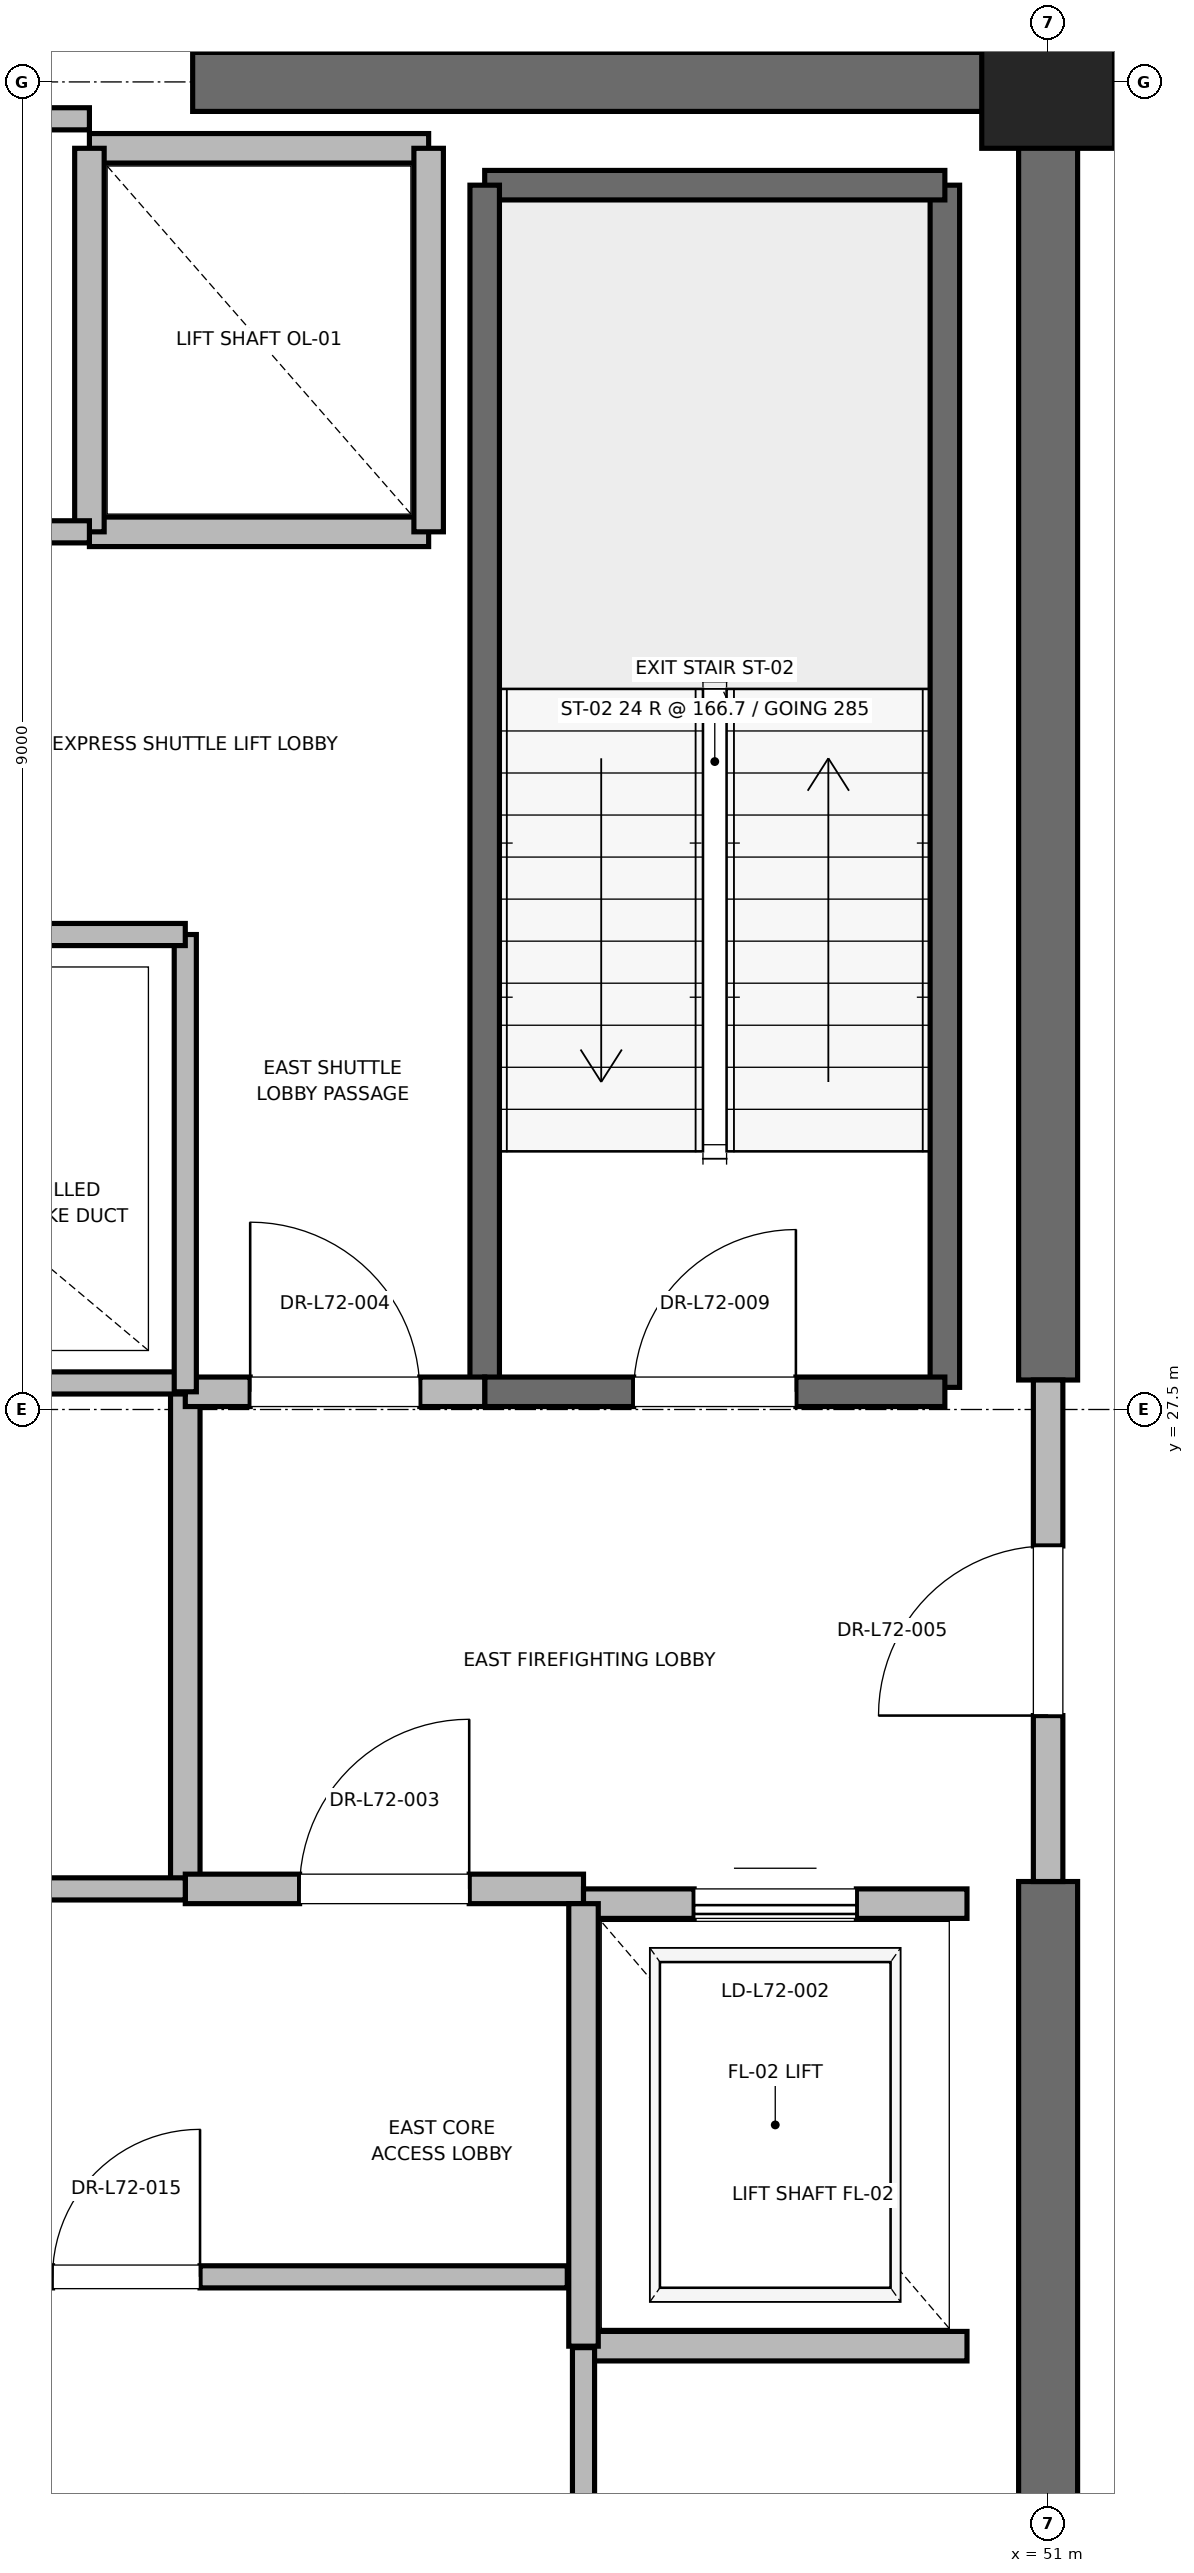
"""IFC4 building model, lengths in metres.
Left out: names, types, materials, properties, quantities, classifications, styles, units other than length and angle.
Written with IfcOpenShell. Run it as: python <this file> out.ifc"""

import sys

from ifc_helpers import new_model, si_unit, direction, frame, frame_2d, origin, origin_2d, place, context, subcontext, project, spatial, rectangle, extrude, element, fill, save


model = new_model("IFC4")
c1 = context("Model", 3, precision=1e-05, world=origin(), true_north=direction((0.0, 1.0)))
c2 = subcontext(c1, "Body", "Model", "MODEL_VIEW")
j1 = project(units=[si_unit("LENGTHUNIT", "METRE"), si_unit("PLANEANGLEUNIT", "RADIAN")], contexts=[c1])
p1 = place(None, origin())
s1 = spatial("IfcSite", under=j1, at=p1, CompositionType="ELEMENT")
p2 = place(p1, origin())
s2 = spatial("IfcBuilding", under=s1, at=p2, CompositionType="ELEMENT")
p3 = place(p2, frame((0.0, 0.0, 310.8)))
s3 = spatial("IfcBuildingStorey", under=s2, at=p3, CompositionType="ELEMENT", Elevation=310.8)
p4 = place(p3, frame((51.0, 36.5, 0.0), z_axis=(0.0, 0.0, 1.0), x_axis=(1.0, 0.0, 0.0)))
e1 = element("IfcColumn", 1, at=p4, inside=s3, PredefinedType="PILASTER", context=c2, shape_type="SweptSolid", body=[
    extrude(rectangle(XDim=0.9, YDim=0.9, at=origin_2d()), origin(), (0.0, 0.0, 1.0), 4.0),
])
for number, where, z_axis, x_axis in (
    (2, (45.2, 36.5, 0.0), (0.0, 0.0, 1.0), (1.0, 0.0, 0.0)),
    (3, (51.0, 18.5, 0.0), (0.0, 0.0, 1.0), (0.0, 1.0, 0.0)),
):
    element("IfcWall", number, at=place(p3, frame(where, z_axis=z_axis, x_axis=x_axis)), inside=s3, PredefinedType="SHEAR", context=c2, shape_type="SweptSolid", body=[
        extrude(rectangle(XDim=5.8, YDim=0.4, at=frame_2d((2.9, 0.0))), origin(), (0.0, 0.0, 1.0), 3.785),
    ])
p5 = place(p3, frame((51.0, 27.7, 0.0), z_axis=(0.0, 0.0, 1.0), x_axis=(0.0, 1.0, 0.0)))
e4 = element("IfcWall", 4, at=p5, inside=s3, PredefinedType="SHEAR", context=c2, shape_type="SweptSolid", body=[
    extrude(rectangle(XDim=8.8, YDim=0.4, at=frame_2d((4.4, 0.0))), origin(), (0.0, 0.0, 1.0), 3.785),
])
p6 = place(p3, frame((50.3, 27.65, 0.0), z_axis=(0.0, 0.0, 1.0), x_axis=(0.0, 1.0, 0.0)))
e5 = element("IfcWall", 5, at=p6, inside=s3, PredefinedType="SOLIDWALL", context=c2, shape_type="SweptSolid", body=[
    extrude(rectangle(XDim=8.15, YDim=0.2, at=frame_2d((4.075, 0.0))), origin(), (0.0, 0.0, 1.0), 3.785),
])
p7 = place(p3, frame((47.18, 35.8, 0.0), z_axis=(0.0, 0.0, 1.0), x_axis=(1.0, 0.0, 0.0)))
e6 = element("IfcWall", 6, at=p7, inside=s3, PredefinedType="SOLIDWALL", context=c2, shape_type="SweptSolid", body=[
    extrude(rectangle(XDim=3.12, YDim=0.2, at=frame_2d((1.56, 0.0))), origin(), (0.0, 0.0, 1.0), 3.785),
])
p8 = place(p3, frame((47.18, 27.62, 0.0), z_axis=(0.0, 0.0, 1.0), x_axis=(0.0, 1.0, 0.0)))
e7 = element("IfcWall", 7, at=p8, inside=s3, PredefinedType="SOLIDWALL", context=c2, shape_type="SweptSolid", body=[
    extrude(rectangle(XDim=8.18, YDim=0.2, at=frame_2d((4.09, 0.0))), origin(), (0.0, 0.0, 1.0), 3.785),
])
p9 = place(p3, frame((47.18, 27.62, 0.0), z_axis=(0.0, 0.0, 1.0), x_axis=(1.0, 0.0, 0.0)))
e8 = element("IfcWall", 8, at=p9, inside=s3, PredefinedType="SOLIDWALL", context=c2, shape_type="SweptSolid", body=[
    extrude(rectangle(XDim=3.12, YDim=0.2, at=frame_2d((1.56, 0.0))), origin(), (0.0, 0.0, 1.0), 3.785),
])
p10 = place(p9, frame((1.01, 0.0, 0.0)))
e9 = element("IfcOpeningElement", 9, at=p10, cuts=e8, PredefinedType="OPENING", context=c2, shape_type="SweptSolid", body=[
    extrude(rectangle(XDim=1.1, YDim=2.15, at=frame_2d((0.55, 1.075))), frame((0.0, 0.1, 0.0), z_axis=(0.0, -1.0, 0.0), x_axis=(1.0, 0.0, 0.0)), (0.0, 0.0, 1.0), 0.2),
])
p11 = place(p3, frame((45.15, 24.25, 0.0), z_axis=(0.0, 0.0, 1.0), x_axis=(0.0, 1.0, 0.0)))
e10 = element("IfcWall", 10, at=p11, inside=s3, PredefinedType="PARTITIONING", context=c2, shape_type="SweptSolid", body=[
    extrude(rectangle(XDim=3.37, YDim=0.2, at=frame_2d((1.685, 0.0))), origin(), (0.0, 0.0, 1.0), 3.785),
])
p12 = place(p3, frame((45.15, 24.25, 0.0), z_axis=(0.0, 0.0, 1.0), x_axis=(1.0, 0.0, 0.0)))
e11 = element("IfcWall", 11, at=p12, inside=s3, PredefinedType="PARTITIONING", context=c2, shape_type="SweptSolid", body=[
    extrude(rectangle(XDim=2.7, YDim=0.2, at=frame_2d((1.35, 0.0))), origin(), (0.0, 0.0, 1.0), 3.785),
])
p13 = place(p12, frame((0.775, 0.0, 0.0)))
e12 = element("IfcOpeningElement", 12, at=p13, cuts=e11, PredefinedType="OPENING", context=c2, shape_type="SweptSolid", body=[
    extrude(rectangle(XDim=1.15, YDim=2.2, at=frame_2d((0.575, 1.1))), frame((0.0, 0.1, 0.0), z_axis=(0.0, -1.0, 0.0), x_axis=(1.0, 0.0, 0.0)), (0.0, 0.0, 1.0), 0.2),
])
p14 = place(p3, frame((45.15, 27.62, 0.0), z_axis=(0.0, 0.0, 1.0), x_axis=(1.0, 0.0, 0.0)))
e13 = element("IfcWall", 13, at=p14, inside=s3, PredefinedType="PARTITIONING", context=c2, shape_type="SweptSolid", body=[
    extrude(rectangle(XDim=2.03, YDim=0.2, at=frame_2d((1.015, 0.0))), origin(), (0.0, 0.0, 1.0), 3.785),
])
p15 = place(p14, frame((0.44, 0.0, 0.0)))
e14 = element("IfcOpeningElement", 14, at=p15, cuts=e13, PredefinedType="OPENING", context=c2, shape_type="SweptSolid", body=[
    extrude(rectangle(XDim=1.15, YDim=2.2, at=frame_2d((0.575, 1.1))), frame((0.0, 0.1, 0.0), z_axis=(0.0, -1.0, 0.0), x_axis=(1.0, 0.0, 0.0)), (0.0, 0.0, 1.0), 0.2),
])
p16 = place(p3, frame((51.0, 24.3, 0.0), z_axis=(0.0, 0.0, 1.0), x_axis=(0.0, 1.0, 0.0)))
e15 = element("IfcWall", 15, at=p16, inside=s3, PredefinedType="PARTITIONING", context=c2, shape_type="SweptSolid", body=[
    extrude(rectangle(XDim=3.4, YDim=0.2, at=frame_2d((1.7, 0.0))), origin(), (0.0, 0.0, 1.0), 2.865),
])
p17 = place(p16, frame((1.125, 0.0, 0.0)))
e16 = element("IfcOpeningElement", 16, at=p17, cuts=e15, PredefinedType="OPENING", context=c2, shape_type="SweptSolid", body=[
    extrude(rectangle(XDim=1.15, YDim=2.2, at=frame_2d((0.575, 1.1))), frame((0.0, 0.1, 0.0), z_axis=(0.0, -1.0, 0.0), x_axis=(1.0, 0.0, 0.0)), (0.0, 0.0, 1.0), 0.2),
])
p18 = place(p3, frame((47.85, 21.15, 0.0), z_axis=(0.0, 0.0, 1.0), x_axis=(1.0, 0.0, 0.0)))
e17 = element("IfcWall", 17, at=p18, inside=s3, PredefinedType="SOLIDWALL", context=c2, shape_type="SweptSolid", body=[
    extrude(rectangle(XDim=2.6, YDim=0.2, at=frame_2d((1.3, 0.0))), origin(), (0.0, 0.0, 1.0), 3.785),
])
p19 = place(p3, frame((50.45, 24.15, 0.0), z_axis=(0.0, 0.0, 1.0), x_axis=(-1.0, 0.0, 0.0)))
e18 = element("IfcWall", 18, at=p19, inside=s3, PredefinedType="SOLIDWALL", context=c2, shape_type="SweptSolid", body=[
    extrude(rectangle(XDim=2.6, YDim=0.2, at=frame_2d((1.3, 0.0))), origin(), (0.0, 0.0, 1.0), 2.865),
])
p20 = place(p19, frame((0.75, 0.0, 0.0)))
e19 = element("IfcOpeningElement", 19, at=p20, cuts=e18, PredefinedType="OPENING", context=c2, shape_type="SweptSolid", body=[
    extrude(rectangle(XDim=1.1, YDim=2.2, at=frame_2d((0.55, 1.1))), frame((0.0, 0.1, 0.0), z_axis=(0.0, -1.0, 0.0), x_axis=(1.0, 0.0, 0.0)), (0.0, 0.0, 1.0), 0.2),
])
p21 = place(p3, frame((47.85, 24.15, 0.0), z_axis=(0.0, 0.0, 1.0), x_axis=(0.0, -1.0, 0.0)))
e20 = element("IfcWall", 20, at=p21, inside=s3, PredefinedType="SOLIDWALL", context=c2, shape_type="SweptSolid", body=[
    extrude(rectangle(XDim=3.0, YDim=0.2, at=frame_2d((1.5, 0.0))), origin(), (0.0, 0.0, 1.0), 3.785),
])
p22 = place(p3, frame((44.5, 33.45, 0.0), z_axis=(0.0, 0.0, 1.0), x_axis=(1.0, 0.0, 0.0)))
e21 = element("IfcWall", 21, at=p22, inside=s3, PredefinedType="SOLIDWALL", context=c2, shape_type="SweptSolid", body=[
    extrude(rectangle(XDim=2.3, YDim=0.2, at=frame_2d((1.15, 0.0))), origin(), (0.0, 0.0, 1.0), 3.785),
])
p23 = place(p3, frame((46.8, 36.05, 0.0), z_axis=(0.0, 0.0, 1.0), x_axis=(-1.0, 0.0, 0.0)))
e22 = element("IfcWall", 22, at=p23, inside=s3, PredefinedType="SOLIDWALL", context=c2, shape_type="SweptSolid", body=[
    extrude(rectangle(XDim=2.3, YDim=0.2, at=frame_2d((1.15, 0.0))), origin(), (0.0, 0.0, 1.0), 2.865),
])
p24 = place(p3, frame((44.5, 36.05, 0.0), z_axis=(0.0, 0.0, 1.0), x_axis=(0.0, -1.0, 0.0)))
e23 = element("IfcWall", 23, at=p24, inside=s3, PredefinedType="SOLIDWALL", context=c2, shape_type="SweptSolid", body=[
    extrude(rectangle(XDim=2.6, YDim=0.2, at=frame_2d((1.3, 0.0))), origin(), (0.0, 0.0, 1.0), 2.865),
])
p25 = place(p3, frame((46.8, 33.45, 0.0), z_axis=(0.0, 0.0, 1.0), x_axis=(0.0, 1.0, 0.0)))
e24 = element("IfcWall", 24, at=p25, inside=s3, PredefinedType="SOLIDWALL", context=c2, shape_type="SweptSolid", body=[
    extrude(rectangle(XDim=2.6, YDim=0.2, at=frame_2d((1.3, 0.0))), origin(), (0.0, 0.0, 1.0), 3.785),
])
p26 = place(p3, frame((41.56, 27.68, 0.0), z_axis=(0.0, 0.0, 1.0), x_axis=(1.0, 0.0, 0.0)))
e25 = element("IfcWall", 25, at=p26, inside=s3, PredefinedType="PARTITIONING", context=c2, shape_type="SweptSolid", body=[
    extrude(rectangle(XDim=3.59, YDim=0.15, at=frame_2d((1.795, 0.0))), origin(), (0.0, 0.0, 1.0), 2.85),
])
p27 = place(p3, frame((47.85, 18.6, 0.0), z_axis=(0.0, 0.0, 1.0), x_axis=(0.0, 1.0, 0.0)))
e26 = element("IfcWall", 26, at=p27, inside=s3, PredefinedType="PARTITIONING", context=c2, shape_type="SweptSolid", body=[
    extrude(rectangle(XDim=2.54, YDim=0.15, at=frame_2d((1.27, 0.0))), origin(), (0.0, 0.0, 1.0), 2.85),
])
p28 = place(p3, frame((41.76, 21.62, 0.0), z_axis=(0.0, 0.0, 1.0), x_axis=(1.0, 0.0, 0.0)))
e27 = element("IfcWall", 27, at=p28, inside=s3, PredefinedType="PARTITIONING", context=c2, shape_type="SweptSolid", body=[
    extrude(rectangle(XDim=5.98, YDim=0.15, at=frame_2d((2.99, 0.0))), origin(), (0.0, 0.0, 1.0), 2.85),
])
p29 = place(p28, frame((2.49, 0.0, 0.0)))
e28 = element("IfcOpeningElement", 28, at=p29, cuts=e27, PredefinedType="OPENING", context=c2, shape_type="SweptSolid", body=[
    extrude(rectangle(XDim=1.0, YDim=2.15, at=frame_2d((0.5, 1.075))), frame((0.0, 0.075, 0.0), z_axis=(0.0, -1.0, 0.0), x_axis=(1.0, 0.0, 0.0)), (0.0, 0.0, 1.0), 0.15),
])
p30 = place(p3, frame((41.76, 24.25, 0.0), z_axis=(0.0, 0.0, 1.0), x_axis=(1.0, 0.0, 0.0)))
e29 = element("IfcWall", 29, at=p30, inside=s3, PredefinedType="PARTITIONING", context=c2, shape_type="SweptSolid", body=[
    extrude(rectangle(XDim=3.39, YDim=0.15, at=frame_2d((1.695, 0.0))), origin(), (0.0, 0.0, 1.0), 2.85),
])
p31 = place(p30, frame((1.195, 0.0, 0.0)))
e30 = element("IfcOpeningElement", 30, at=p31, cuts=e29, PredefinedType="OPENING", context=c2, shape_type="SweptSolid", body=[
    extrude(rectangle(XDim=1.0, YDim=2.15, at=frame_2d((0.5, 1.075))), frame((0.0, 0.075, 0.0), z_axis=(0.0, -1.0, 0.0), x_axis=(1.0, 0.0, 0.0)), (0.0, 0.0, 1.0), 0.15),
])
p32 = place(p3, frame((45.15, 27.62, 0.0), z_axis=(0.0, 0.0, 1.0), x_axis=(0.0, 1.0, 0.0)))
e31 = element("IfcWall", 31, at=p32, inside=s3, PredefinedType="PARTITIONING", context=c2, shape_type="SweptSolid", body=[
    extrude(rectangle(XDim=3.1, YDim=0.15, at=frame_2d((1.55, 0.0))), origin(), (0.0, 0.0, 1.0), 2.85),
])
p33 = place(p3, frame((41.56, 30.72, 0.0), z_axis=(0.0, 0.0, 1.0), x_axis=(1.0, 0.0, 0.0)))
e32 = element("IfcWall", 32, at=p33, inside=s3, PredefinedType="PARTITIONING", context=c2, shape_type="SweptSolid", body=[
    extrude(rectangle(XDim=3.59, YDim=0.15, at=frame_2d((1.795, 0.0))), origin(), (0.0, 0.0, 1.0), 2.85),
])
p34 = place(p33, frame((1.355, 0.0, 0.0)))
e33 = element("IfcOpeningElement", 33, at=p34, cuts=e32, PredefinedType="OPENING", context=c2, shape_type="SweptSolid", body=[
    extrude(rectangle(XDim=0.88, YDim=2.1, at=frame_2d((0.44, 1.05))), frame((0.0, 0.075, 0.0), z_axis=(0.0, -1.0, 0.0), x_axis=(1.0, 0.0, 0.0)), (0.0, 0.0, 1.0), 0.15),
])
p35 = place(p3, frame((41.56, 36.25, 0.0), z_axis=(0.0, 0.0, 1.0), x_axis=(1.0, 0.0, 0.0)))
e34 = element("IfcWall", 34, at=p35, inside=s3, PredefinedType="PARTITIONING", context=c2, shape_type="SweptSolid", body=[
    extrude(rectangle(XDim=2.94, YDim=0.15, at=frame_2d((1.47, 0.0))), origin(), (0.0, 0.0, 1.0), 2.85),
])
p36 = place(p3, frame((41.56, 33.45, 0.0), z_axis=(0.0, 0.0, 1.0), x_axis=(1.0, 0.0, 0.0)))
e35 = element("IfcWall", 35, at=p36, inside=s3, PredefinedType="PARTITIONING", context=c2, shape_type="SweptSolid", body=[
    extrude(rectangle(XDim=2.94, YDim=0.15, at=frame_2d((1.47, 0.0))), origin(), (0.0, 0.0, 1.0), 2.85),
])
p37 = place(p36, frame((1.03, 0.0, 0.0)))
e36 = element("IfcOpeningElement", 36, at=p37, cuts=e35, PredefinedType="OPENING", context=c2, shape_type="SweptSolid", body=[
    extrude(rectangle(XDim=0.88, YDim=2.1, at=frame_2d((0.44, 1.05))), frame((0.0, 0.075, 0.0), z_axis=(0.0, -1.0, 0.0), x_axis=(1.0, 0.0, 0.0)), (0.0, 0.0, 1.0), 0.15),
])
p38 = place(p10, origin())
e37 = element("IfcDoor", 37, at=p38, inside=s3, OperationType="SINGLE_SWING_RIGHT", PredefinedType="DOOR", context=c2, shape_type="SweptSolid", body=[
    extrude(rectangle(XDim=1.1, YDim=2.15, at=frame_2d((0.55, 1.075))), frame((0.0, 0.025, 0.0), z_axis=(0.0, -1.0, 0.0), x_axis=(1.0, 0.0, 0.0)), (0.0, 0.0, 1.0), 0.05),
])
fill(e9, e37)
p39 = place(p13, origin())
e38 = element("IfcDoor", 38, at=p39, inside=s3, OperationType="SINGLE_SWING_RIGHT", PredefinedType="DOOR", context=c2, shape_type="SweptSolid", body=[
    extrude(rectangle(XDim=1.15, YDim=2.2, at=frame_2d((0.575, 1.1))), frame((0.0, 0.025, 0.0), z_axis=(0.0, -1.0, 0.0), x_axis=(1.0, 0.0, 0.0)), (0.0, 0.0, 1.0), 0.05),
])
fill(e12, e38)
p40 = place(p15, origin())
e39 = element("IfcDoor", 39, at=p40, inside=s3, OperationType="SINGLE_SWING_LEFT", PredefinedType="DOOR", context=c2, shape_type="SweptSolid", body=[
    extrude(rectangle(XDim=1.15, YDim=2.2, at=frame_2d((0.575, 1.1))), frame((0.0, 0.025, 0.0), z_axis=(0.0, -1.0, 0.0), x_axis=(1.0, 0.0, 0.0)), (0.0, 0.0, 1.0), 0.05),
])
fill(e14, e39)
p41 = place(p17, origin())
e40 = element("IfcDoor", 40, at=p41, inside=s3, OperationType="SINGLE_SWING_LEFT", PredefinedType="DOOR", context=c2, shape_type="SweptSolid", body=[
    extrude(rectangle(XDim=1.15, YDim=2.2, at=frame_2d((0.575, 1.1))), frame((0.0, 0.025, 0.0), z_axis=(0.0, -1.0, 0.0), x_axis=(1.0, 0.0, 0.0)), (0.0, 0.0, 1.0), 0.05),
])
fill(e16, e40)
p42 = place(p20, origin())
e41 = element("IfcDoor", 41, at=p42, inside=s3, OperationType="SLIDING_TO_RIGHT", PredefinedType="DOOR", context=c2, shape_type="SweptSolid", body=[
    extrude(rectangle(XDim=1.1, YDim=2.2, at=frame_2d((0.55, 1.1))), frame((0.0, 0.025, 0.0), z_axis=(0.0, -1.0, 0.0), x_axis=(1.0, 0.0, 0.0)), (0.0, 0.0, 1.0), 0.05),
])
fill(e19, e41)
p43 = place(p29, origin())
e42 = element("IfcDoor", 42, at=p43, inside=s3, OperationType="SINGLE_SWING_RIGHT", PredefinedType="DOOR", context=c2, shape_type="SweptSolid", body=[
    extrude(rectangle(XDim=1.0, YDim=2.15, at=frame_2d((0.5, 1.075))), frame((0.0, 0.025, 0.0), z_axis=(0.0, -1.0, 0.0), x_axis=(1.0, 0.0, 0.0)), (0.0, 0.0, 1.0), 0.05),
])
fill(e28, e42)
save(model, sys.argv[1])
